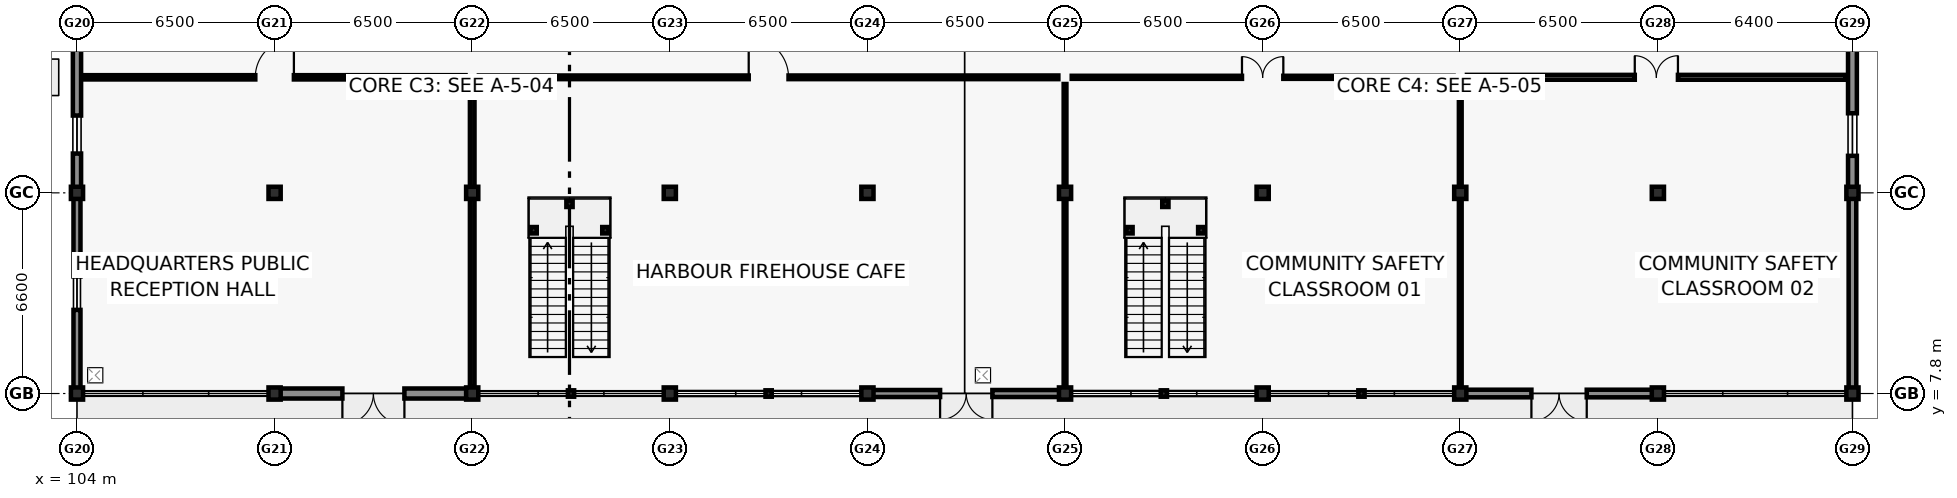
"""IFC4 building model, lengths in metres.
Left out: names, types, materials, properties, quantities, classifications, styles, units other than length and angle.
Written with IfcOpenShell. Run it as: python <this file> out.ifc"""

import sys

from ifc_helpers import new_model, si_unit, direction, frame, frame_2d, origin, origin_2d, place, context, subcontext, project, spatial, rectangle, i_section, extrude, element, fill, save


model = new_model("IFC4")
c1 = context("Model", 3, precision=1e-05, world=origin(), true_north=direction((0.0, 1.0)))
c2 = subcontext(c1, "Body", "Model", "MODEL_VIEW")
j1 = project(units=[si_unit("LENGTHUNIT", "METRE"), si_unit("PLANEANGLEUNIT", "RADIAN")], contexts=[c1])
p1 = place(None, origin())
s1 = spatial("IfcSite", under=j1, at=p1, CompositionType="ELEMENT")
p2 = place(p1, origin())
s2 = spatial("IfcBuilding", under=s1, at=p2, CompositionType="ELEMENT")
p3 = place(p2, origin())
s3 = spatial("IfcBuildingStorey", under=s2, at=p3, CompositionType="ELEMENT", Elevation=0.0)
for number, where, z_axis, x_axis in (
    (1, (104.0, 7.8, 0.0), (0.0, 0.0, 1.0), (1.0, 0.0, 0.0)),
    (2, (104.0, 14.4, 0.0), (0.0, 0.0, 1.0), (1.0, 0.0, 0.0)),
    (3, (110.5, 7.8, 0.0), (0.0, 0.0, 1.0), (1.0, 0.0, 0.0)),
    (4, (110.5, 14.4, 0.0), (0.0, 0.0, 1.0), (1.0, 0.0, 0.0)),
    (5, (117.0, 7.8, 0.0), (0.0, 0.0, 1.0), (1.0, 0.0, 0.0)),
    (6, (117.0, 14.4, 0.0), (0.0, 0.0, 1.0), (1.0, 0.0, 0.0)),
    (7, (123.5, 7.8, 0.0), (0.0, 0.0, 1.0), (1.0, 0.0, 0.0)),
    (8, (123.5, 14.4, 0.0), (0.0, 0.0, 1.0), (1.0, 0.0, 0.0)),
    (9, (130.0, 7.8, 0.0), (0.0, 0.0, 1.0), (1.0, 0.0, 0.0)),
    (10, (130.0, 14.4, 0.0), (0.0, 0.0, 1.0), (1.0, 0.0, 0.0)),
    (11, (136.5, 7.8, 0.0), (0.0, 0.0, 1.0), (1.0, 0.0, 0.0)),
    (12, (136.5, 14.4, 0.0), (0.0, 0.0, 1.0), (1.0, 0.0, 0.0)),
    (13, (143.0, 7.8, 0.0), (0.0, 0.0, 1.0), (1.0, 0.0, 0.0)),
    (14, (143.0, 14.4, 0.0), (0.0, 0.0, 1.0), (1.0, 0.0, 0.0)),
    (15, (149.5, 7.8, 0.0), (0.0, 0.0, 1.0), (1.0, 0.0, 0.0)),
    (16, (149.5, 14.4, 0.0), (0.0, 0.0, 1.0), (1.0, 0.0, 0.0)),
    (17, (156.0, 7.8, 0.0), (0.0, 0.0, 1.0), (1.0, 0.0, 0.0)),
    (18, (156.0, 14.4, 0.0), (0.0, 0.0, 1.0), (1.0, 0.0, 0.0)),
    (19, (162.4, 7.8, 0.0), (0.0, 0.0, 1.0), (1.0, 0.0, 0.0)),
    (20, (162.4, 14.4, 0.0), (0.0, 0.0, 1.0), (1.0, 0.0, 0.0)),
):
    element("IfcColumn", number, at=place(p3, frame(where, z_axis=z_axis, x_axis=x_axis)), inside=s3, PredefinedType="COLUMN", context=c2, shape_type="SweptSolid", body=[
        extrude(i_section(OverallWidth=0.4, OverallDepth=0.4, WebThickness=0.02, FlangeThickness=0.032, at=origin_2d()), origin(), (0.0, 0.0, 1.0), 5.4),
    ])
for number, where, z_axis, x_axis in (
    (21, (120.25, 7.8, 0.0), (0.0, 0.0, 1.0), (1.0, 0.0, 0.0)),
    (22, (126.75, 7.8, 0.0), (0.0, 0.0, 1.0), (1.0, 0.0, 0.0)),
    (23, (139.75, 7.8, 0.0), (0.0, 0.0, 1.0), (1.0, 0.0, 0.0)),
    (24, (146.25, 7.8, 0.0), (0.0, 0.0, 1.0), (1.0, 0.0, 0.0)),
):
    element("IfcColumn", number, at=place(p3, frame(where, z_axis=z_axis, x_axis=x_axis)), inside=s3, PredefinedType="PILASTER", context=c2, shape_type="SweptSolid", body=[
        extrude(i_section(OverallWidth=0.205, OverallDepth=0.21, WebThickness=0.009, FlangeThickness=0.014, FilletRadius=0.011, at=origin_2d()), origin(), (0.0, 0.0, 1.0), 5.4),
    ])
p4 = place(p3, frame((116.995, 7.8, 0.0), z_axis=(0.0, 0.0, 1.0), x_axis=(-1.0, 0.0, 0.0)))
e25 = element("IfcWall", 25, at=p4, inside=s3, PredefinedType="SOLIDWALL", context=c2, shape_type="SweptSolid", body=[
    extrude(rectangle(XDim=6.49, YDim=0.33, at=frame_2d((3.245, 0.0))), origin(), (0.0, 0.0, 1.0), 4.52),
])
p5 = place(p4, frame((2.225, 0.0, 0.0)))
e26 = element("IfcOpeningElement", 26, at=p5, cuts=e25, PredefinedType="OPENING", context=c2, shape_type="SweptSolid", body=[
    extrude(rectangle(XDim=2.04, YDim=2.28, at=frame_2d((1.02, 1.14))), frame((0.0, 0.175, 0.0), z_axis=(0.0, -1.0, 0.0), x_axis=(1.0, 0.0, 0.0)), (0.0, 0.0, 1.0), 0.35),
])
p6 = place(p3, frame((136.495, 7.8, 0.0), z_axis=(0.0, 0.0, 1.0), x_axis=(-1.0, 0.0, 0.0)))
e27 = element("IfcWall", 27, at=p6, inside=s3, PredefinedType="SOLIDWALL", context=c2, shape_type="SweptSolid", body=[
    extrude(rectangle(XDim=6.49, YDim=0.23, at=frame_2d((3.245, 0.0))), origin(), (0.0, 0.0, 1.0), 4.52),
])
p7 = place(p6, frame((2.385, 0.0, 0.0)))
e28 = element("IfcOpeningElement", 28, at=p7, cuts=e27, PredefinedType="OPENING", context=c2, shape_type="SweptSolid", body=[
    extrude(rectangle(XDim=1.72, YDim=2.2, at=frame_2d((0.86, 1.1))), frame((0.0, 0.125, 0.0), z_axis=(0.0, -1.0, 0.0), x_axis=(1.0, 0.0, 0.0)), (0.0, 0.0, 1.0), 0.25),
])
p8 = place(p3, frame((155.995, 7.8, 0.0), z_axis=(0.0, 0.0, 1.0), x_axis=(-1.0, 0.0, 0.0)))
e29 = element("IfcWall", 29, at=p8, inside=s3, PredefinedType="SOLIDWALL", context=c2, shape_type="SweptSolid", body=[
    extrude(rectangle(XDim=6.49, YDim=0.25, at=frame_2d((3.245, 0.0))), origin(), (0.0, 0.0, 1.0), 4.52),
])
p9 = place(p8, frame((2.335, 0.0, 0.0)))
e30 = element("IfcOpeningElement", 30, at=p9, cuts=e29, PredefinedType="OPENING", context=c2, shape_type="SweptSolid", body=[
    extrude(rectangle(XDim=1.82, YDim=2.2, at=frame_2d((0.91, 1.1))), frame((0.0, 0.135, 0.0), z_axis=(0.0, -1.0, 0.0), x_axis=(1.0, 0.0, 0.0)), (0.0, 0.0, 1.0), 0.27),
])
p10 = place(p3, frame((104.0, 7.805, 0.0), z_axis=(0.0, 0.0, 1.0), x_axis=(0.0, 1.0, 0.0)))
e31 = element("IfcWall", 31, at=p10, inside=s3, PredefinedType="SOLIDWALL", context=c2, shape_type="SweptSolid", body=[
    extrude(rectangle(XDim=6.59, YDim=0.23, at=frame_2d((3.295, 0.0))), origin(), (0.0, 0.0, 1.0), 4.52),
])
p11 = place(p10, frame((2.745, 0.0, 0.8)))
e32 = element("IfcOpeningElement", 32, at=p11, cuts=e31, PredefinedType="OPENING", context=c2, shape_type="SweptSolid", body=[
    extrude(rectangle(XDim=1.1, YDim=1.65, at=frame_2d((0.55, 0.825))), frame((0.0, 0.125, 0.0), z_axis=(0.0, -1.0, 0.0), x_axis=(1.0, 0.0, 0.0)), (0.0, 0.0, 1.0), 0.25),
])
p12 = place(p3, frame((162.4, 14.395, 0.0), z_axis=(0.0, 0.0, 1.0), x_axis=(0.0, -1.0, 0.0)))
e33 = element("IfcWall", 33, at=p12, inside=s3, PredefinedType="SOLIDWALL", context=c2, shape_type="SweptSolid", body=[
    extrude(rectangle(XDim=6.59, YDim=0.25, at=frame_2d((3.295, 0.0))), origin(), (0.0, 0.0, 1.0), 4.52),
])
p13 = place(p3, frame((104.0, 14.405, 0.0), z_axis=(0.0, 0.0, 1.0), x_axis=(0.0, 1.0, 0.0)))
e34 = element("IfcWall", 34, at=p13, inside=s3, PredefinedType="SOLIDWALL", context=c2, shape_type="SweptSolid", body=[
    extrude(rectangle(XDim=6.59, YDim=0.27, at=frame_2d((3.295, 0.0))), origin(), (0.0, 0.0, 1.0), 4.52),
])
p14 = place(p13, frame((1.288, 0.0, 0.8)))
e35 = element("IfcOpeningElement", 35, at=p14, cuts=e34, PredefinedType="OPENING", context=c2, shape_type="SweptSolid", body=[
    extrude(rectangle(XDim=1.25, YDim=1.65, at=frame_2d((0.625, 0.825))), frame((0.0, 0.145, 0.0), z_axis=(0.0, -1.0, 0.0), x_axis=(1.0, 0.0, 0.0)), (0.0, 0.0, 1.0), 0.29),
])
p15 = place(p3, frame((162.4, 20.995, 0.0), z_axis=(0.0, 0.0, 1.0), x_axis=(0.0, -1.0, 0.0)))
e36 = element("IfcWall", 36, at=p15, inside=s3, PredefinedType="SOLIDWALL", context=c2, shape_type="SweptSolid", body=[
    extrude(rectangle(XDim=6.59, YDim=0.29, at=frame_2d((3.295, 0.0))), origin(), (0.0, 0.0, 1.0), 4.52),
])
p16 = place(p15, frame((3.978, 0.0, 0.8)))
e37 = element("IfcOpeningElement", 37, at=p16, cuts=e36, PredefinedType="OPENING", context=c2, shape_type="SweptSolid", body=[
    extrude(rectangle(XDim=1.4, YDim=1.65, at=frame_2d((0.7, 0.825))), frame((0.0, 0.155, 0.0), z_axis=(0.0, -1.0, 0.0), x_axis=(1.0, 0.0, 0.0)), (0.0, 0.0, 1.0), 0.31),
])
for number, where, z_axis, x_axis in (
    (38, (119.02, 13.17, 0.0), (0.0, 0.0, 1.0), (1.0, 0.0, 0.0)),
    (39, (121.38, 13.17, 0.0), (0.0, 0.0, 1.0), (1.0, 0.0, 0.0)),
    (40, (120.2, 14.04, 0.0), (0.0, 0.0, 1.0), (1.0, 0.0, 0.0)),
    (41, (138.62, 13.17, 0.0), (0.0, 0.0, 1.0), (1.0, 0.0, 0.0)),
    (42, (140.98, 13.17, 0.0), (0.0, 0.0, 1.0), (1.0, 0.0, 0.0)),
    (43, (139.8, 14.04, 0.0), (0.0, 0.0, 1.0), (1.0, 0.0, 0.0)),
):
    element("IfcColumn", number, at=place(p3, frame(where, z_axis=z_axis, x_axis=x_axis)), inside=s3, PredefinedType="COLUMN", context=c2, shape_type="SweptSolid", body=[
        extrude(i_section(OverallWidth=0.205, OverallDepth=0.21, WebThickness=0.009, FlangeThickness=0.014, FilletRadius=0.011, at=origin_2d()), origin(), (0.0, 0.0, 1.0), 2.52),
    ])
p17 = place(p3, frame((117.0, 8.02, 0.0), z_axis=(0.0, 0.0, 1.0), x_axis=(0.0, 1.0, 0.0)))
e44 = element("IfcWall", 44, at=p17, inside=s3, PredefinedType="PARTITIONING", context=c2, shape_type="SweptSolid", body=[
    extrude(rectangle(XDim=9.96, YDim=0.15, at=frame_2d((4.98, 0.0))), origin(), (0.0, 0.0, 1.0), 4.5),
])
p18 = place(p3, frame((104.22, 18.2, 0.0), z_axis=(0.0, 0.0, 1.0), x_axis=(1.0, 0.0, 0.0)))
e45 = element("IfcWall", 45, at=p18, inside=s3, PredefinedType="PARTITIONING", context=c2, shape_type="SweptSolid", body=[
    extrude(rectangle(XDim=12.56, YDim=0.14, at=frame_2d((6.28, 0.0))), origin(), (0.0, 0.0, 1.0), 4.5),
])
p19 = place(p18, frame((5.645, 0.0, 0.0)))
e46 = element("IfcOpeningElement", 46, at=p19, cuts=e45, PredefinedType="OPENING", context=c2, shape_type="SweptSolid", body=[
    extrude(rectangle(XDim=1.27, YDim=2.1, at=frame_2d((0.635, 1.05))), frame((0.0, 0.08, 0.0), z_axis=(0.0, -1.0, 0.0), x_axis=(1.0, 0.0, 0.0)), (0.0, 0.0, 1.0), 0.16),
])
p20 = place(p3, frame((136.5, 8.02, 0.0), z_axis=(0.0, 0.0, 1.0), x_axis=(0.0, 1.0, 0.0)))
e47 = element("IfcWall", 47, at=p20, inside=s3, PredefinedType="MOVABLE", context=c2, shape_type="SweptSolid", body=[
    extrude(rectangle(XDim=9.96, YDim=0.09, at=frame_2d((4.98, 0.0))), origin(), (0.0, 0.0, 1.0), 4.5),
])
p21 = place(p3, frame((117.22, 18.2, 0.0), z_axis=(0.0, 0.0, 1.0), x_axis=(1.0, 0.0, 0.0)))
e48 = element("IfcWall", 48, at=p21, inside=s3, PredefinedType="PARTITIONING", context=c2, shape_type="SweptSolid", body=[
    extrude(rectangle(XDim=19.06, YDim=0.12, at=frame_2d((9.53, 0.0))), origin(), (0.0, 0.0, 1.0), 4.5),
])
p22 = place(p21, frame((8.875, 0.0, 0.0)))
e49 = element("IfcOpeningElement", 49, at=p22, cuts=e48, PredefinedType="OPENING", context=c2, shape_type="SweptSolid", body=[
    extrude(rectangle(XDim=1.31, YDim=2.14, at=frame_2d((0.655, 1.07))), frame((0.0, 0.07, 0.0), z_axis=(0.0, -1.0, 0.0), x_axis=(1.0, 0.0, 0.0)), (0.0, 0.0, 1.0), 0.14),
])
p23 = place(p3, frame((149.5, 8.02, 0.0), z_axis=(0.0, 0.0, 1.0), x_axis=(0.0, 1.0, 0.0)))
e50 = element("IfcWall", 50, at=p23, inside=s3, PredefinedType="MOVABLE", context=c2, shape_type="SweptSolid", body=[
    extrude(rectangle(XDim=9.96, YDim=0.09, at=frame_2d((4.98, 0.0))), origin(), (0.0, 0.0, 1.0), 4.5),
])
p24 = place(p3, frame((136.72, 18.2, 0.0), z_axis=(0.0, 0.0, 1.0), x_axis=(1.0, 0.0, 0.0)))
e51 = element("IfcWall", 51, at=p24, inside=s3, PredefinedType="PARTITIONING", context=c2, shape_type="SweptSolid", body=[
    extrude(rectangle(XDim=12.56, YDim=0.1, at=frame_2d((6.28, 0.0))), origin(), (0.0, 0.0, 1.0), 4.5),
])
p25 = place(p24, frame((5.6, 0.0, 0.0)))
e52 = element("IfcOpeningElement", 52, at=p25, cuts=e51, PredefinedType="OPENING", context=c2, shape_type="SweptSolid", body=[
    extrude(rectangle(XDim=1.36, YDim=2.15, at=frame_2d((0.68, 1.075))), frame((0.0, 0.06, 0.0), z_axis=(0.0, -1.0, 0.0), x_axis=(1.0, 0.0, 0.0)), (0.0, 0.0, 1.0), 0.12),
])
p26 = place(p3, frame((149.72, 18.2, 0.0), z_axis=(0.0, 0.0, 1.0), x_axis=(1.0, 0.0, 0.0)))
e53 = element("IfcWall", 53, at=p26, inside=s3, PredefinedType="PARTITIONING", context=c2, shape_type="SweptSolid", body=[
    extrude(rectangle(XDim=12.46, YDim=0.16, at=frame_2d((6.23, 0.0))), origin(), (0.0, 0.0, 1.0), 4.5),
])
p27 = place(p26, frame((5.52, 0.0, 0.0)))
e54 = element("IfcOpeningElement", 54, at=p27, cuts=e53, PredefinedType="OPENING", context=c2, shape_type="SweptSolid", body=[
    extrude(rectangle(XDim=1.42, YDim=2.15, at=frame_2d((0.71, 1.075))), frame((0.0, 0.09, 0.0), z_axis=(0.0, -1.0, 0.0), x_axis=(1.0, 0.0, 0.0)), (0.0, 0.0, 1.0), 0.18),
])
p28 = place(p5, origin())
e55 = element("IfcDoor", 55, at=p28, inside=s3, OperationType="DOUBLE_DOOR_SINGLE_SWING", PredefinedType="DOOR", context=c2, shape_type="SweptSolid", body=[
    extrude(rectangle(XDim=2.04, YDim=2.28, at=frame_2d((1.02, 1.14))), frame((0.0, 0.025, 0.0), z_axis=(0.0, -1.0, 0.0), x_axis=(1.0, 0.0, 0.0)), (0.0, 0.0, 1.0), 0.05),
])
fill(e26, e55)
p29 = place(p7, origin())
e56 = element("IfcDoor", 56, at=p29, inside=s3, OperationType="DOUBLE_DOOR_SINGLE_SWING", PredefinedType="DOOR", context=c2, shape_type="SweptSolid", body=[
    extrude(rectangle(XDim=1.72, YDim=2.2, at=frame_2d((0.86, 1.1))), frame((0.0, 0.025, 0.0), z_axis=(0.0, -1.0, 0.0), x_axis=(1.0, 0.0, 0.0)), (0.0, 0.0, 1.0), 0.05),
])
fill(e28, e56)
p30 = place(p9, origin())
e57 = element("IfcDoor", 57, at=p30, inside=s3, OperationType="DOUBLE_DOOR_SINGLE_SWING", PredefinedType="DOOR", context=c2, shape_type="SweptSolid", body=[
    extrude(rectangle(XDim=1.82, YDim=2.2, at=frame_2d((0.91, 1.1))), frame((0.0, 0.025, 0.0), z_axis=(0.0, -1.0, 0.0), x_axis=(1.0, 0.0, 0.0)), (0.0, 0.0, 1.0), 0.05),
])
fill(e30, e57)
p31 = place(p11, origin())
e58 = element("IfcWindow", 58, at=p31, inside=s3, PartitioningType="SINGLE_PANEL", PredefinedType="WINDOW", context=c2, shape_type="SweptSolid", body=[
    extrude(rectangle(XDim=1.1, YDim=1.65, at=frame_2d((0.55, 0.825))), frame((0.0, 0.03, 0.0), z_axis=(0.0, -1.0, 0.0), x_axis=(1.0, 0.0, 0.0)), (0.0, 0.0, 1.0), 0.06),
])
fill(e32, e58)
p32 = place(p14, origin())
e59 = element("IfcWindow", 59, at=p32, inside=s3, PartitioningType="SINGLE_PANEL", PredefinedType="WINDOW", context=c2, shape_type="SweptSolid", body=[
    extrude(rectangle(XDim=1.25, YDim=1.65, at=frame_2d((0.625, 0.825))), frame((0.0, 0.03, 0.0), z_axis=(0.0, -1.0, 0.0), x_axis=(1.0, 0.0, 0.0)), (0.0, 0.0, 1.0), 0.06),
])
fill(e35, e59)
p33 = place(p16, origin())
e60 = element("IfcWindow", 60, at=p33, inside=s3, PartitioningType="SINGLE_PANEL", PredefinedType="WINDOW", context=c2, shape_type="SweptSolid", body=[
    extrude(rectangle(XDim=1.4, YDim=1.65, at=frame_2d((0.7, 0.825))), frame((0.0, 0.03, 0.0), z_axis=(0.0, -1.0, 0.0), x_axis=(1.0, 0.0, 0.0)), (0.0, 0.0, 1.0), 0.06),
])
fill(e37, e60)
p34 = place(p19, origin())
e61 = element("IfcDoor", 61, at=p34, inside=s3, OperationType="SINGLE_SWING_RIGHT", PredefinedType="DOOR", context=c2, shape_type="SweptSolid", body=[
    extrude(rectangle(XDim=1.27, YDim=2.1, at=frame_2d((0.635, 1.05))), frame((0.0, 0.025, 0.0), z_axis=(0.0, -1.0, 0.0), x_axis=(1.0, 0.0, 0.0)), (0.0, 0.0, 1.0), 0.05),
])
fill(e46, e61)
p35 = place(p22, origin())
e62 = element("IfcDoor", 62, at=p35, inside=s3, OperationType="SINGLE_SWING_LEFT", PredefinedType="DOOR", context=c2, shape_type="SweptSolid", body=[
    extrude(rectangle(XDim=1.31, YDim=2.14, at=frame_2d((0.655, 1.07))), frame((0.0, 0.025, 0.0), z_axis=(0.0, -1.0, 0.0), x_axis=(1.0, 0.0, 0.0)), (0.0, 0.0, 1.0), 0.05),
])
fill(e49, e62)
p36 = place(p25, origin())
e63 = element("IfcDoor", 63, at=p36, inside=s3, OperationType="DOUBLE_DOOR_SINGLE_SWING", PredefinedType="DOOR", context=c2, shape_type="SweptSolid", body=[
    extrude(rectangle(XDim=1.36, YDim=2.15, at=frame_2d((0.68, 1.075))), frame((0.0, 0.025, 0.0), z_axis=(0.0, -1.0, 0.0), x_axis=(1.0, 0.0, 0.0)), (0.0, 0.0, 1.0), 0.05),
])
fill(e52, e63)
p37 = place(p27, origin())
e64 = element("IfcDoor", 64, at=p37, inside=s3, OperationType="DOUBLE_DOOR_SINGLE_SWING", PredefinedType="DOOR", context=c2, shape_type="SweptSolid", body=[
    extrude(rectangle(XDim=1.42, YDim=2.15, at=frame_2d((0.71, 1.075))), frame((0.0, 0.025, 0.0), z_axis=(0.0, -1.0, 0.0), x_axis=(1.0, 0.0, 0.0)), (0.0, 0.0, 1.0), 0.05),
])
fill(e54, e64)
save(model, sys.argv[1])
